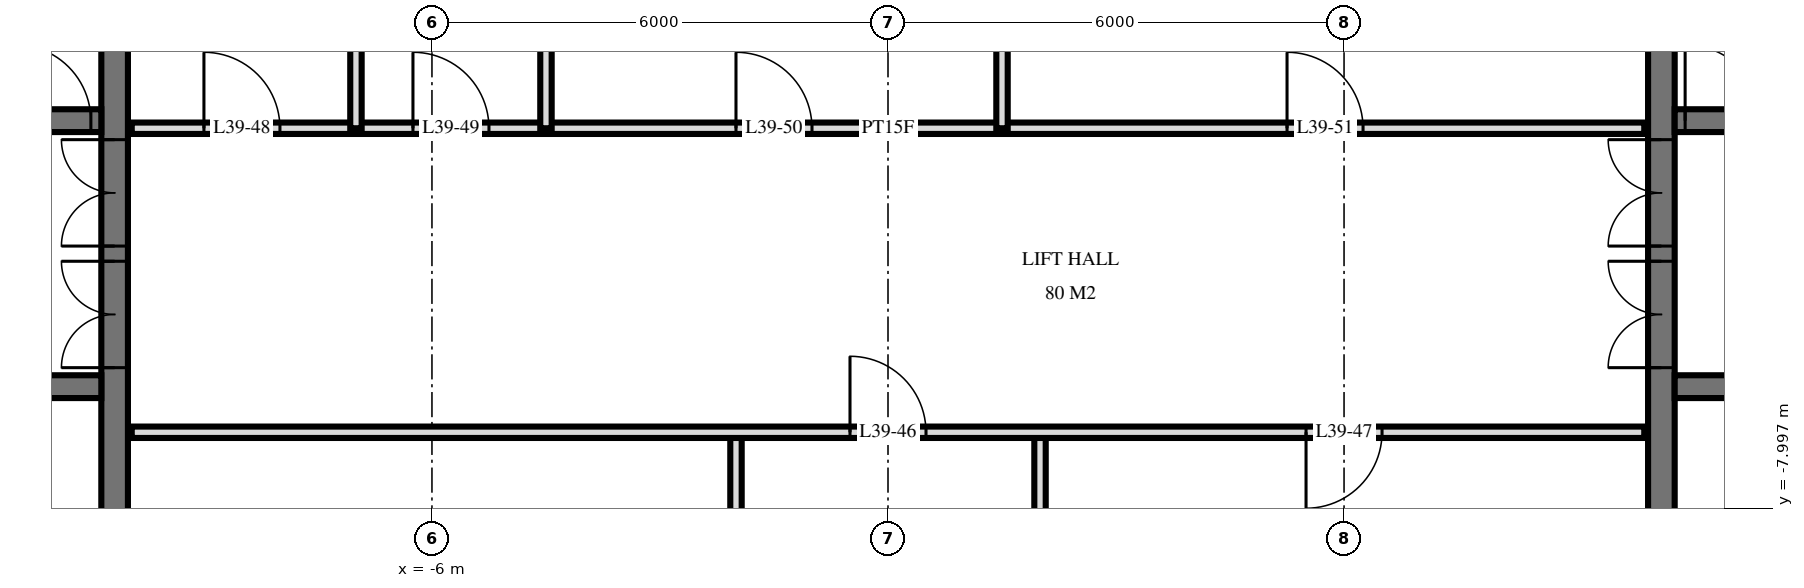
"""IFC4 building model, lengths in metres.
Left out: names, types, materials, properties, quantities, classifications, styles, units other than length and angle.
Written with IfcOpenShell. Run it as: python <this file> out.ifc"""

import sys

from ifc_helpers import new_model, si_unit, direction, frame, frame_2d, origin, place, context, subcontext, project, spatial, rectangle, extrude, element, fill, save


model = new_model("IFC4")
c1 = context("Model", 3, precision=1e-05, world=origin(), true_north=direction((0.0, 1.0)))
c2 = subcontext(c1, "Body", "Model", "MODEL_VIEW")
j1 = project(units=[si_unit("LENGTHUNIT", "METRE"), si_unit("PLANEANGLEUNIT", "RADIAN")], contexts=[c1])
p1 = place(None, origin())
s1 = spatial("IfcSite", under=j1, at=p1, CompositionType="ELEMENT")
p2 = place(p1, origin())
s2 = spatial("IfcBuilding", under=s1, at=p2, CompositionType="ELEMENT")
p3 = place(p2, frame((0.0, 0.0, 152.4)))
s3 = spatial("IfcBuildingStorey", under=s2, at=p3, CompositionType="ELEMENT", Elevation=152.4)
p4 = place(p3, frame((-10.175, -14.55, 0.0), z_axis=(0.0, 0.0, 1.0), x_axis=(0.0, 1.0, 0.0)))
e1 = element("IfcWall", 1, at=p4, inside=s3, PredefinedType="SHEAR", context=c2, shape_type="SweptSolid", body=[
    extrude(rectangle(XDim=14.1, YDim=0.35, at=frame_2d((7.05, 0.0))), origin(), (0.0, 0.0, 1.0), 3.6),
])
p5 = place(p4, frame((8.4, 0.0, 0.0)))
e2 = element("IfcOpeningElement", 2, at=p5, cuts=e1, PredefinedType="OPENING", context=c2, shape_type="SweptSolid", body=[
    extrude(rectangle(XDim=1.4, YDim=2.4, at=frame_2d((0.7, 1.2))), frame((0.0, 0.185, 0.0), z_axis=(0.0, -1.0, 0.0), x_axis=(1.0, 0.0, 0.0)), (0.0, 0.0, 1.0), 0.37),
])
p6 = place(p4, frame((10.0, 0.0, 0.0)))
e3 = element("IfcOpeningElement", 3, at=p6, cuts=e1, PredefinedType="OPENING", context=c2, shape_type="SweptSolid", body=[
    extrude(rectangle(XDim=1.4, YDim=2.4, at=frame_2d((0.7, 1.2))), frame((0.0, 0.185, 0.0), z_axis=(0.0, -1.0, 0.0), x_axis=(1.0, 0.0, 0.0)), (0.0, 0.0, 1.0), 0.37),
])
p7 = place(p4, frame((4.0, 0.0, 0.0)))
e4 = element("IfcOpeningElement", 4, at=p7, cuts=e1, PredefinedType="OPENING", context=c2, shape_type="SweptSolid", body=[
    extrude(rectangle(XDim=1.2, YDim=2.1, at=frame_2d((0.6, 1.05))), frame((0.0, 0.185, 0.0), z_axis=(0.0, -1.0, 0.0), x_axis=(1.0, 0.0, 0.0)), (0.0, 0.0, 1.0), 0.37),
])
p8 = place(p3, frame((-24.05, -2.9, 0.0), z_axis=(0.0, 0.0, 1.0), x_axis=(1.0, 0.0, 0.0)))
e5 = element("IfcWall", 5, at=p8, inside=s3, PredefinedType="SHEAR", context=c2, shape_type="SweptSolid", body=[
    extrude(rectangle(XDim=13.7, YDim=0.3, at=frame_2d((6.85, 0.0))), origin(), (0.0, 0.0, 1.0), 3.6),
])
p9 = place(p8, frame((0.55, 0.0, 0.0)))
e6 = element("IfcOpeningElement", 6, at=p9, cuts=e5, PredefinedType="OPENING", context=c2, shape_type="SweptSolid", body=[
    extrude(rectangle(XDim=1.1, YDim=2.1, at=frame_2d((0.55, 1.05))), frame((0.0, 0.16, 0.0), z_axis=(0.0, -1.0, 0.0), x_axis=(1.0, 0.0, 0.0)), (0.0, 0.0, 1.0), 0.32),
])
p10 = place(p8, frame((6.613, 0.0, 0.0)))
e7 = element("IfcOpeningElement", 7, at=p10, cuts=e5, PredefinedType="OPENING", context=c2, shape_type="SweptSolid", body=[
    extrude(rectangle(XDim=0.9, YDim=2.1, at=frame_2d((0.45, 1.05))), frame((0.0, 0.16, 0.0), z_axis=(0.0, -1.0, 0.0), x_axis=(1.0, 0.0, 0.0)), (0.0, 0.0, 1.0), 0.32),
])
p11 = place(p8, frame((5.188, 0.0, 0.0)))
e8 = element("IfcOpeningElement", 8, at=p11, cuts=e5, PredefinedType="OPENING", context=c2, shape_type="SweptSolid", body=[
    extrude(rectangle(XDim=0.9, YDim=2.1, at=frame_2d((0.45, 1.05))), frame((0.0, 0.16, 0.0), z_axis=(0.0, -1.0, 0.0), x_axis=(1.0, 0.0, 0.0)), (0.0, 0.0, 1.0), 0.32),
])
p12 = place(p8, frame((12.562, 0.0, 0.0)))
e9 = element("IfcOpeningElement", 9, at=p12, cuts=e5, PredefinedType="OPENING", context=c2, shape_type="SweptSolid", body=[
    extrude(rectangle(XDim=1.0, YDim=2.1, at=frame_2d((0.5, 1.05))), frame((0.0, 0.16, 0.0), z_axis=(0.0, -1.0, 0.0), x_axis=(1.0, 0.0, 0.0)), (0.0, 0.0, 1.0), 0.32),
])
p13 = place(p8, frame((11.137, 0.0, 0.0)))
e10 = element("IfcOpeningElement", 10, at=p13, cuts=e5, PredefinedType="OPENING", context=c2, shape_type="SweptSolid", body=[
    extrude(rectangle(XDim=1.0, YDim=2.1, at=frame_2d((0.5, 1.05))), frame((0.0, 0.16, 0.0), z_axis=(0.0, -1.0, 0.0), x_axis=(1.0, 0.0, 0.0)), (0.0, 0.0, 1.0), 0.32),
])
p14 = place(p8, frame((8.85, 0.0, 0.0)))
e11 = element("IfcOpeningElement", 11, at=p14, cuts=e5, PredefinedType="OPENING", context=c2, shape_type="SweptSolid", body=[
    extrude(rectangle(XDim=1.0, YDim=2.1, at=frame_2d((0.5, 1.05))), frame((0.0, 0.16, 0.0), z_axis=(0.0, -1.0, 0.0), x_axis=(1.0, 0.0, 0.0)), (0.0, 0.0, 1.0), 0.32),
])
p15 = place(p8, frame((3.0, 0.0, 0.0)))
e12 = element("IfcOpeningElement", 12, at=p15, cuts=e5, PredefinedType="OPENING", context=c2, shape_type="SweptSolid", body=[
    extrude(rectangle(XDim=1.0, YDim=2.1, at=frame_2d((0.5, 1.05))), frame((0.0, 0.16, 0.0), z_axis=(0.0, -1.0, 0.0), x_axis=(1.0, 0.0, 0.0)), (0.0, 0.0, 1.0), 0.32),
])
p16 = place(p3, frame((-24.05, -6.4, 0.0), z_axis=(0.0, 0.0, 1.0), x_axis=(1.0, 0.0, 0.0)))
e13 = element("IfcWall", 13, at=p16, inside=s3, PredefinedType="SHEAR", context=c2, shape_type="SweptSolid", body=[
    extrude(rectangle(XDim=13.7, YDim=0.3, at=frame_2d((6.85, 0.0))), origin(), (0.0, 0.0, 1.0), 3.6),
])
p17 = place(p16, frame((0.55, 0.0, 0.0)))
e14 = element("IfcOpeningElement", 14, at=p17, cuts=e13, PredefinedType="OPENING", context=c2, shape_type="SweptSolid", body=[
    extrude(rectangle(XDim=1.1, YDim=2.1, at=frame_2d((0.55, 1.05))), frame((0.0, 0.16, 0.0), z_axis=(0.0, -1.0, 0.0), x_axis=(1.0, 0.0, 0.0)), (0.0, 0.0, 1.0), 0.32),
])
p18 = place(p16, frame((5.8, 0.0, 0.0)))
e15 = element("IfcOpeningElement", 15, at=p18, cuts=e13, PredefinedType="OPENING", context=c2, shape_type="SweptSolid", body=[
    extrude(rectangle(XDim=1.1, YDim=2.1, at=frame_2d((0.55, 1.05))), frame((0.0, 0.16, 0.0), z_axis=(0.0, -1.0, 0.0), x_axis=(1.0, 0.0, 0.0)), (0.0, 0.0, 1.0), 0.32),
])
p19 = place(p3, frame((10.175, -14.55, 0.0), z_axis=(0.0, 0.0, 1.0), x_axis=(0.0, 1.0, 0.0)))
e16 = element("IfcWall", 16, at=p19, inside=s3, PredefinedType="SHEAR", context=c2, shape_type="SweptSolid", body=[
    extrude(rectangle(XDim=14.1, YDim=0.35, at=frame_2d((7.05, 0.0))), origin(), (0.0, 0.0, 1.0), 3.6),
])
p20 = place(p19, frame((8.4, 0.0, 0.0)))
e17 = element("IfcOpeningElement", 17, at=p20, cuts=e16, PredefinedType="OPENING", context=c2, shape_type="SweptSolid", body=[
    extrude(rectangle(XDim=1.4, YDim=2.4, at=frame_2d((0.7, 1.2))), frame((0.0, 0.185, 0.0), z_axis=(0.0, -1.0, 0.0), x_axis=(1.0, 0.0, 0.0)), (0.0, 0.0, 1.0), 0.37),
])
p21 = place(p19, frame((10.0, 0.0, 0.0)))
e18 = element("IfcOpeningElement", 18, at=p21, cuts=e16, PredefinedType="OPENING", context=c2, shape_type="SweptSolid", body=[
    extrude(rectangle(XDim=1.4, YDim=2.4, at=frame_2d((0.7, 1.2))), frame((0.0, 0.185, 0.0), z_axis=(0.0, -1.0, 0.0), x_axis=(1.0, 0.0, 0.0)), (0.0, 0.0, 1.0), 0.37),
])
p22 = place(p19, frame((4.0, 0.0, 0.0)))
e19 = element("IfcOpeningElement", 19, at=p22, cuts=e16, PredefinedType="OPENING", context=c2, shape_type="SweptSolid", body=[
    extrude(rectangle(XDim=1.2, YDim=2.1, at=frame_2d((0.6, 1.05))), frame((0.0, 0.185, 0.0), z_axis=(0.0, -1.0, 0.0), x_axis=(1.0, 0.0, 0.0)), (0.0, 0.0, 1.0), 0.37),
])
p23 = place(p3, frame((10.35, -2.9, 0.0), z_axis=(0.0, 0.0, 1.0), x_axis=(1.0, 0.0, 0.0)))
e20 = element("IfcWall", 20, at=p23, inside=s3, PredefinedType="SHEAR", context=c2, shape_type="SweptSolid", body=[
    extrude(rectangle(XDim=13.7, YDim=0.3, at=frame_2d((6.85, 0.0))), origin(), (0.0, 0.0, 1.0), 3.6),
])
p24 = place(p23, frame((12.05, 0.0, 0.0)))
e21 = element("IfcOpeningElement", 21, at=p24, cuts=e20, PredefinedType="OPENING", context=c2, shape_type="SweptSolid", body=[
    extrude(rectangle(XDim=1.1, YDim=2.1, at=frame_2d((0.55, 1.05))), frame((0.0, 0.16, 0.0), z_axis=(0.0, -1.0, 0.0), x_axis=(1.0, 0.0, 0.0)), (0.0, 0.0, 1.0), 0.32),
])
p25 = place(p23, frame((6.188, 0.0, 0.0)))
e22 = element("IfcOpeningElement", 22, at=p25, cuts=e20, PredefinedType="OPENING", context=c2, shape_type="SweptSolid", body=[
    extrude(rectangle(XDim=0.9, YDim=2.1, at=frame_2d((0.45, 1.05))), frame((0.0, 0.16, 0.0), z_axis=(0.0, -1.0, 0.0), x_axis=(1.0, 0.0, 0.0)), (0.0, 0.0, 1.0), 0.32),
])
p26 = place(p23, frame((7.613, 0.0, 0.0)))
e23 = element("IfcOpeningElement", 23, at=p26, cuts=e20, PredefinedType="OPENING", context=c2, shape_type="SweptSolid", body=[
    extrude(rectangle(XDim=0.9, YDim=2.1, at=frame_2d((0.45, 1.05))), frame((0.0, 0.16, 0.0), z_axis=(0.0, -1.0, 0.0), x_axis=(1.0, 0.0, 0.0)), (0.0, 0.0, 1.0), 0.32),
])
p27 = place(p23, frame((0.137, 0.0, 0.0)))
e24 = element("IfcOpeningElement", 24, at=p27, cuts=e20, PredefinedType="OPENING", context=c2, shape_type="SweptSolid", body=[
    extrude(rectangle(XDim=1.0, YDim=2.1, at=frame_2d((0.5, 1.05))), frame((0.0, 0.16, 0.0), z_axis=(0.0, -1.0, 0.0), x_axis=(1.0, 0.0, 0.0)), (0.0, 0.0, 1.0), 0.32),
])
p28 = place(p23, frame((1.562, 0.0, 0.0)))
e25 = element("IfcOpeningElement", 25, at=p28, cuts=e20, PredefinedType="OPENING", context=c2, shape_type="SweptSolid", body=[
    extrude(rectangle(XDim=1.0, YDim=2.1, at=frame_2d((0.5, 1.05))), frame((0.0, 0.16, 0.0), z_axis=(0.0, -1.0, 0.0), x_axis=(1.0, 0.0, 0.0)), (0.0, 0.0, 1.0), 0.32),
])
p29 = place(p23, frame((3.85, 0.0, 0.0)))
e26 = element("IfcOpeningElement", 26, at=p29, cuts=e20, PredefinedType="OPENING", context=c2, shape_type="SweptSolid", body=[
    extrude(rectangle(XDim=1.0, YDim=2.1, at=frame_2d((0.5, 1.05))), frame((0.0, 0.16, 0.0), z_axis=(0.0, -1.0, 0.0), x_axis=(1.0, 0.0, 0.0)), (0.0, 0.0, 1.0), 0.32),
])
p30 = place(p23, frame((9.7, 0.0, 0.0)))
e27 = element("IfcOpeningElement", 27, at=p30, cuts=e20, PredefinedType="OPENING", context=c2, shape_type="SweptSolid", body=[
    extrude(rectangle(XDim=1.0, YDim=2.1, at=frame_2d((0.5, 1.05))), frame((0.0, 0.16, 0.0), z_axis=(0.0, -1.0, 0.0), x_axis=(1.0, 0.0, 0.0)), (0.0, 0.0, 1.0), 0.32),
])
p31 = place(p3, frame((10.35, -6.4, 0.0), z_axis=(0.0, 0.0, 1.0), x_axis=(1.0, 0.0, 0.0)))
e28 = element("IfcWall", 28, at=p31, inside=s3, PredefinedType="SHEAR", context=c2, shape_type="SweptSolid", body=[
    extrude(rectangle(XDim=13.7, YDim=0.3, at=frame_2d((6.85, 0.0))), origin(), (0.0, 0.0, 1.0), 3.6),
])
p32 = place(p31, frame((12.05, 0.0, 0.0)))
e29 = element("IfcOpeningElement", 29, at=p32, cuts=e28, PredefinedType="OPENING", context=c2, shape_type="SweptSolid", body=[
    extrude(rectangle(XDim=1.1, YDim=2.1, at=frame_2d((0.55, 1.05))), frame((0.0, 0.16, 0.0), z_axis=(0.0, -1.0, 0.0), x_axis=(1.0, 0.0, 0.0)), (0.0, 0.0, 1.0), 0.32),
])
p33 = place(p31, frame((6.8, 0.0, 0.0)))
e30 = element("IfcOpeningElement", 30, at=p33, cuts=e28, PredefinedType="OPENING", context=c2, shape_type="SweptSolid", body=[
    extrude(rectangle(XDim=1.1, YDim=2.1, at=frame_2d((0.55, 1.05))), frame((0.0, 0.16, 0.0), z_axis=(0.0, -1.0, 0.0), x_axis=(1.0, 0.0, 0.0)), (0.0, 0.0, 1.0), 0.32),
])
p34 = place(p3, frame((2.0, -11.0, 0.0), z_axis=(0.0, 0.0, 1.0), x_axis=(0.0, 1.0, 0.0)))
e31 = element("IfcWall", 31, at=p34, inside=s3, PredefinedType="PARTITIONING", context=c2, shape_type="SweptSolid", body=[
    extrude(rectangle(XDim=4.0, YDim=0.15, at=frame_2d((2.0, 0.0))), origin(), (0.0, 0.0, 1.0), 3.32),
])
p35 = place(p3, frame((1.5, -3.0, 0.0), z_axis=(0.0, 0.0, 1.0), x_axis=(0.0, 1.0, 0.0)))
e32 = element("IfcWall", 32, at=p35, inside=s3, PredefinedType="PARTITIONING", context=c2, shape_type="SweptSolid", body=[
    extrude(rectangle(XDim=4.02, YDim=0.15, at=frame_2d((2.01, 0.0))), origin(), (0.0, 0.0, 1.0), 3.32),
])
p36 = place(p3, frame((-2.0, -11.0, 0.0), z_axis=(0.0, 0.0, 1.0), x_axis=(0.0, 1.0, 0.0)))
e33 = element("IfcWall", 33, at=p36, inside=s3, PredefinedType="PARTITIONING", context=c2, shape_type="SweptSolid", body=[
    extrude(rectangle(XDim=4.0, YDim=0.15, at=frame_2d((2.0, 0.0))), origin(), (0.0, 0.0, 1.0), 3.32),
])
for number, where, z_axis, x_axis in (
    (34, (-4.5, -3.0, 0.0), (0.0, 0.0, 1.0), (0.0, 1.0, 0.0)),
    (35, (-7.0, -3.0, 0.0), (0.0, 0.0, 1.0), (0.0, 1.0, 0.0)),
):
    element("IfcWall", number, at=place(p3, frame(where, z_axis=z_axis, x_axis=x_axis)), inside=s3, PredefinedType="PLUMBINGWALL", context=c2, shape_type="SweptSolid", body=[
        extrude(rectangle(XDim=4.02, YDim=0.15, at=frame_2d((2.01, 0.0))), origin(), (0.0, 0.0, 1.0), 3.32),
    ])
p37 = place(p3, frame((-9.95, -7.0, 0.0), z_axis=(0.0, 0.0, 1.0), x_axis=(1.0, 0.0, 0.0)))
e36 = element("IfcWall", 36, at=p37, inside=s3, PredefinedType="PARTITIONING", context=c2, shape_type="SweptSolid", body=[
    extrude(rectangle(XDim=19.9, YDim=0.15, at=frame_2d((9.95, 0.0))), origin(), (0.0, 0.0, 1.0), 3.32),
])
p38 = place(p37, frame((9.45, 0.0, 0.0)))
e37 = element("IfcOpeningElement", 37, at=p38, cuts=e36, PredefinedType="OPENING", context=c2, shape_type="SweptSolid", body=[
    extrude(rectangle(XDim=1.0, YDim=2.1, at=frame_2d((0.5, 1.05))), frame((0.0, 0.085, 0.0), z_axis=(0.0, -1.0, 0.0), x_axis=(1.0, 0.0, 0.0)), (0.0, 0.0, 1.0), 0.17),
])
p39 = place(p37, frame((15.45, 0.0, 0.0)))
e38 = element("IfcOpeningElement", 38, at=p39, cuts=e36, PredefinedType="OPENING", context=c2, shape_type="SweptSolid", body=[
    extrude(rectangle(XDim=1.0, YDim=2.1, at=frame_2d((0.5, 1.05))), frame((0.0, 0.085, 0.0), z_axis=(0.0, -1.0, 0.0), x_axis=(1.0, 0.0, 0.0)), (0.0, 0.0, 1.0), 0.17),
])
p40 = place(p3, frame((-9.95, -3.0, 0.0), z_axis=(0.0, 0.0, 1.0), x_axis=(1.0, 0.0, 0.0)))
e39 = element("IfcWall", 39, at=p40, inside=s3, PredefinedType="PARTITIONING", context=c2, shape_type="SweptSolid", body=[
    extrude(rectangle(XDim=19.9, YDim=0.15, at=frame_2d((9.95, 0.0))), origin(), (0.0, 0.0, 1.0), 3.32),
])
p41 = place(p40, frame((0.95, 0.0, 0.0)))
e40 = element("IfcOpeningElement", 40, at=p41, cuts=e39, PredefinedType="OPENING", context=c2, shape_type="SweptSolid", body=[
    extrude(rectangle(XDim=1.0, YDim=2.1, at=frame_2d((0.5, 1.05))), frame((0.0, 0.085, 0.0), z_axis=(0.0, -1.0, 0.0), x_axis=(1.0, 0.0, 0.0)), (0.0, 0.0, 1.0), 0.17),
])
p42 = place(p40, frame((3.7, 0.0, 0.0)))
e41 = element("IfcOpeningElement", 41, at=p42, cuts=e39, PredefinedType="OPENING", context=c2, shape_type="SweptSolid", body=[
    extrude(rectangle(XDim=1.0, YDim=2.1, at=frame_2d((0.5, 1.05))), frame((0.0, 0.085, 0.0), z_axis=(0.0, -1.0, 0.0), x_axis=(1.0, 0.0, 0.0)), (0.0, 0.0, 1.0), 0.17),
])
p43 = place(p40, frame((7.95, 0.0, 0.0)))
e42 = element("IfcOpeningElement", 42, at=p43, cuts=e39, PredefinedType="OPENING", context=c2, shape_type="SweptSolid", body=[
    extrude(rectangle(XDim=1.0, YDim=2.1, at=frame_2d((0.5, 1.05))), frame((0.0, 0.085, 0.0), z_axis=(0.0, -1.0, 0.0), x_axis=(1.0, 0.0, 0.0)), (0.0, 0.0, 1.0), 0.17),
])
p44 = place(p40, frame((15.2, 0.0, 0.0)))
e43 = element("IfcOpeningElement", 43, at=p44, cuts=e39, PredefinedType="OPENING", context=c2, shape_type="SweptSolid", body=[
    extrude(rectangle(XDim=1.0, YDim=2.1, at=frame_2d((0.5, 1.05))), frame((0.0, 0.085, 0.0), z_axis=(0.0, -1.0, 0.0), x_axis=(1.0, 0.0, 0.0)), (0.0, 0.0, 1.0), 0.17),
])
p45 = place(p5, origin())
e44 = element("IfcDoor", 44, at=p45, inside=s3, OperationType="DOUBLE_DOOR_SINGLE_SWING", PredefinedType="DOOR", context=c2, shape_type="SweptSolid", body=[
    extrude(rectangle(XDim=1.4, YDim=2.4, at=frame_2d((0.7, 1.2))), frame((0.0, 0.025, 0.0), z_axis=(0.0, -1.0, 0.0), x_axis=(1.0, 0.0, 0.0)), (0.0, 0.0, 1.0), 0.05),
])
fill(e2, e44)
p46 = place(p6, origin())
e45 = element("IfcDoor", 45, at=p46, inside=s3, OperationType="DOUBLE_DOOR_SINGLE_SWING", PredefinedType="DOOR", context=c2, shape_type="SweptSolid", body=[
    extrude(rectangle(XDim=1.4, YDim=2.4, at=frame_2d((0.7, 1.2))), frame((0.0, 0.025, 0.0), z_axis=(0.0, -1.0, 0.0), x_axis=(1.0, 0.0, 0.0)), (0.0, 0.0, 1.0), 0.05),
])
fill(e3, e45)
p47 = place(p12, origin())
e46 = element("IfcDoor", 46, at=p47, inside=s3, OperationType="SINGLE_SWING_RIGHT", PredefinedType="DOOR", context=c2, shape_type="SweptSolid", body=[
    extrude(rectangle(XDim=1.0, YDim=2.1, at=frame_2d((0.5, 1.05))), frame((0.0, 0.025, 0.0), z_axis=(0.0, -1.0, 0.0), x_axis=(1.0, 0.0, 0.0)), (0.0, 0.0, 1.0), 0.05),
])
fill(e9, e46)
p48 = place(p20, origin())
e47 = element("IfcDoor", 47, at=p48, inside=s3, OperationType="DOUBLE_DOOR_SINGLE_SWING", PredefinedType="DOOR", context=c2, shape_type="SweptSolid", body=[
    extrude(rectangle(XDim=1.4, YDim=2.4, at=frame_2d((0.7, 1.2))), frame((0.0, 0.025, 0.0), z_axis=(0.0, -1.0, 0.0), x_axis=(1.0, 0.0, 0.0)), (0.0, 0.0, 1.0), 0.05),
])
fill(e17, e47)
p49 = place(p21, origin())
e48 = element("IfcDoor", 48, at=p49, inside=s3, OperationType="DOUBLE_DOOR_SINGLE_SWING", PredefinedType="DOOR", context=c2, shape_type="SweptSolid", body=[
    extrude(rectangle(XDim=1.4, YDim=2.4, at=frame_2d((0.7, 1.2))), frame((0.0, 0.025, 0.0), z_axis=(0.0, -1.0, 0.0), x_axis=(1.0, 0.0, 0.0)), (0.0, 0.0, 1.0), 0.05),
])
fill(e18, e48)
p50 = place(p27, origin())
e49 = element("IfcDoor", 49, at=p50, inside=s3, OperationType="SINGLE_SWING_RIGHT", PredefinedType="DOOR", context=c2, shape_type="SweptSolid", body=[
    extrude(rectangle(XDim=1.0, YDim=2.1, at=frame_2d((0.5, 1.05))), frame((0.0, 0.025, 0.0), z_axis=(0.0, -1.0, 0.0), x_axis=(1.0, 0.0, 0.0)), (0.0, 0.0, 1.0), 0.05),
])
fill(e24, e49)
p51 = place(p38, origin())
e50 = element("IfcDoor", 50, at=p51, inside=s3, OperationType="SINGLE_SWING_RIGHT", PredefinedType="DOOR", context=c2, shape_type="SweptSolid", body=[
    extrude(rectangle(XDim=1.0, YDim=2.1, at=frame_2d((0.5, 1.05))), frame((0.0, 0.025, 0.0), z_axis=(0.0, -1.0, 0.0), x_axis=(1.0, 0.0, 0.0)), (0.0, 0.0, 1.0), 0.05),
])
fill(e37, e50)
p52 = place(p39, frame((0.5, 0.0, 0.0), z_axis=(0.0, 0.0, 1.0), x_axis=(-1.0, 0.0, 0.0)))
e51 = element("IfcDoor", 51, at=p52, inside=s3, OperationType="SINGLE_SWING_LEFT", PredefinedType="DOOR", context=c2, shape_type="SweptSolid", body=[
    extrude(rectangle(XDim=1.0, YDim=2.1, at=frame_2d((0.0, 1.05))), frame((0.0, -0.025, 0.0), z_axis=(0.0, 1.0, 0.0), x_axis=(-1.0, 0.0, 0.0)), (0.0, 0.0, 1.0), 0.05),
])
fill(e38, e51)
p53 = place(p41, origin())
e52 = element("IfcDoor", 52, at=p53, inside=s3, OperationType="SINGLE_SWING_RIGHT", PredefinedType="DOOR", context=c2, shape_type="SweptSolid", body=[
    extrude(rectangle(XDim=1.0, YDim=2.1, at=frame_2d((0.5, 1.05))), frame((0.0, 0.025, 0.0), z_axis=(0.0, -1.0, 0.0), x_axis=(1.0, 0.0, 0.0)), (0.0, 0.0, 1.0), 0.05),
])
fill(e40, e52)
p54 = place(p42, origin())
e53 = element("IfcDoor", 53, at=p54, inside=s3, OperationType="SINGLE_SWING_RIGHT", PredefinedType="DOOR", context=c2, shape_type="SweptSolid", body=[
    extrude(rectangle(XDim=1.0, YDim=2.1, at=frame_2d((0.5, 1.05))), frame((0.0, 0.025, 0.0), z_axis=(0.0, -1.0, 0.0), x_axis=(1.0, 0.0, 0.0)), (0.0, 0.0, 1.0), 0.05),
])
fill(e41, e53)
p55 = place(p43, origin())
e54 = element("IfcDoor", 54, at=p55, inside=s3, OperationType="SINGLE_SWING_RIGHT", PredefinedType="DOOR", context=c2, shape_type="SweptSolid", body=[
    extrude(rectangle(XDim=1.0, YDim=2.1, at=frame_2d((0.5, 1.05))), frame((0.0, 0.025, 0.0), z_axis=(0.0, -1.0, 0.0), x_axis=(1.0, 0.0, 0.0)), (0.0, 0.0, 1.0), 0.05),
])
fill(e42, e54)
p56 = place(p44, origin())
e55 = element("IfcDoor", 55, at=p56, inside=s3, OperationType="SINGLE_SWING_RIGHT", PredefinedType="DOOR", context=c2, shape_type="SweptSolid", body=[
    extrude(rectangle(XDim=1.0, YDim=2.1, at=frame_2d((0.5, 1.05))), frame((0.0, 0.025, 0.0), z_axis=(0.0, -1.0, 0.0), x_axis=(1.0, 0.0, 0.0)), (0.0, 0.0, 1.0), 0.05),
])
fill(e43, e55)
save(model, sys.argv[1])
